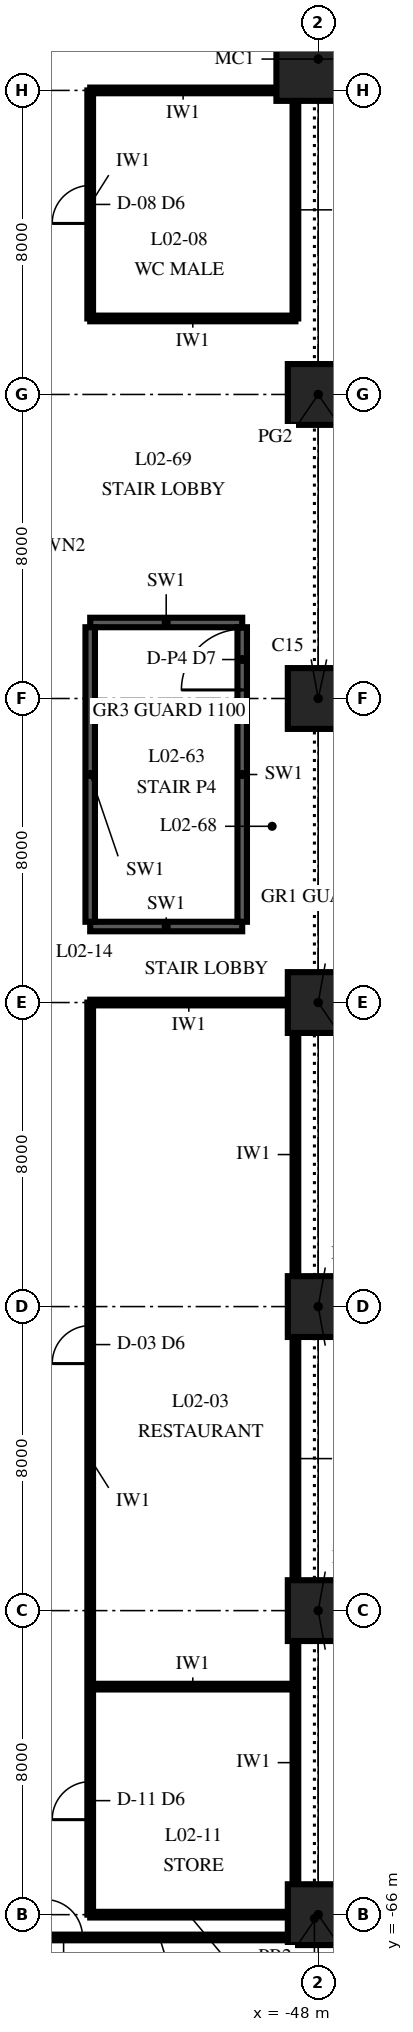
"""IFC4 building model, lengths in metres.
Left out: names, types, materials, properties, quantities, classifications, styles, units other than length and angle.
Written with IfcOpenShell. Run it as: python <this file> out.ifc"""

import sys

from ifc_helpers import new_model, si_unit, direction, frame, frame_2d, origin, origin_2d, place, context, subcontext, project, spatial, rectangle, extrude, element, fill, save


model = new_model("IFC4")
c1 = context("Model", 3, precision=1e-05, world=origin(), true_north=direction((0.0, 1.0)))
c2 = subcontext(c1, "Body", "Model", "MODEL_VIEW")
j1 = project(units=[si_unit("LENGTHUNIT", "METRE"), si_unit("PLANEANGLEUNIT", "RADIAN")], contexts=[c1])
p1 = place(None, origin())
s1 = spatial("IfcSite", under=j1, at=p1, CompositionType="ELEMENT")
p2 = place(p1, origin())
s2 = spatial("IfcBuilding", under=s1, at=p2, CompositionType="ELEMENT")
p3 = place(p2, frame((0.0, 0.0, 12.0)))
s3 = spatial("IfcBuildingStorey", under=s2, at=p3, CompositionType="ELEMENT", Elevation=12.0)
for number, where, z_axis, x_axis in (
    (1, (-48.0, -66.0, 0.0), (0.0, 0.0, 1.0), (1.0, 0.0, 0.0)),
    (2, (-48.0, -58.0, 0.0), (0.0, 0.0, 1.0), (1.0, 0.0, 0.0)),
    (3, (-48.0, -50.0, 0.0), (0.0, 0.0, 1.0), (1.0, 0.0, 0.0)),
    (4, (-48.0, -42.0, 0.0), (0.0, 0.0, 1.0), (1.0, 0.0, 0.0)),
    (5, (-48.0, -34.0, 0.0), (0.0, 0.0, 1.0), (1.0, 0.0, 0.0)),
    (6, (-48.0, -26.0, 0.0), (0.0, 0.0, 1.0), (1.0, 0.0, 0.0)),
):
    element("IfcColumn", number, at=place(p3, frame(where, z_axis=z_axis, x_axis=x_axis)), inside=s3, PredefinedType="COLUMN", context=c2, shape_type="SweptSolid", body=[
        extrude(rectangle(XDim=1.6, YDim=1.6, at=origin_2d()), origin(), (0.0, 0.0, 1.0), 8.108),
    ])
p4 = place(p3, frame((-48.0, -17.175, 0.0), z_axis=(0.0, 0.0, 1.0), x_axis=(1.0, 0.0, 0.0)))
e7 = element("IfcColumn", 7, at=p4, inside=s3, PredefinedType="COLUMN", context=c2, shape_type="SweptSolid", body=[
    extrude(rectangle(XDim=2.2, YDim=2.2, at=origin_2d()), origin(), (0.0, 0.0, 1.0), 8.6),
])
for number, where, z_axis, x_axis in (
    (8, (-54.0, -40.0, 0.0), (0.0, 0.0, 1.0), (1.0, 0.0, 0.0)),
    (9, (-50.0, -32.0, 0.0), (0.0, 0.0, 1.0), (-1.0, 0.0, 0.0)),
):
    element("IfcWall", number, at=place(p3, frame(where, z_axis=z_axis, x_axis=x_axis)), inside=s3, PredefinedType="SOLIDWALL", context=c2, shape_type="SweptSolid", body=[
        extrude(rectangle(XDim=4.0, YDim=0.25, at=frame_2d((2.0, 0.0))), origin(), (0.0, 0.0, 1.0), 7.0),
    ])
p5 = place(p3, frame((-50.0, -39.875, 0.0), z_axis=(0.0, 0.0, 1.0), x_axis=(0.0, 1.0, 0.0)))
e10 = element("IfcWall", 10, at=p5, inside=s3, PredefinedType="SOLIDWALL", context=c2, shape_type="SweptSolid", body=[
    extrude(rectangle(XDim=7.75, YDim=0.25, at=frame_2d((3.875, 0.0))), origin(), (0.0, 0.0, 1.0), 7.0),
])
p6 = place(p5, frame((6.1, 0.0, 0.0)))
e11 = element("IfcOpeningElement", 11, at=p6, cuts=e10, PredefinedType="OPENING", context=c2, shape_type="SweptSolid", body=[
    extrude(rectangle(XDim=1.6, YDim=2.1, at=frame_2d((0.8, 1.05))), frame((0.0, 0.14, 0.0), z_axis=(0.0, -1.0, 0.0), x_axis=(1.0, 0.0, 0.0)), (0.0, 0.0, 1.0), 0.28),
])
p7 = place(p3, frame((-54.0, -32.125, 0.0), z_axis=(0.0, 0.0, 1.0), x_axis=(0.0, -1.0, 0.0)))
e12 = element("IfcWall", 12, at=p7, inside=s3, PredefinedType="SOLIDWALL", context=c2, shape_type="SweptSolid", body=[
    extrude(rectangle(XDim=7.75, YDim=0.25, at=frame_2d((3.875, 0.0))), origin(), (0.0, 0.0, 1.0), 7.0),
])
p8 = place(p3, frame((-54.0, -66.0, 0.0), z_axis=(0.0, 0.0, 1.0), x_axis=(0.0, 1.0, 0.0)))
e13 = element("IfcWall", 13, at=p8, inside=s3, PredefinedType="PARTITIONING", context=c2, shape_type="SweptSolid", body=[
    extrude(rectangle(XDim=24.0, YDim=0.15, at=frame_2d((12.0, 0.0))), origin(), (0.0, 0.0, 1.0), 6.7),
])
p9 = place(p8, frame((2.5, 0.0, 0.0)))
e14 = element("IfcOpeningElement", 14, at=p9, cuts=e13, PredefinedType="OPENING", context=c2, shape_type="SweptSolid", body=[
    extrude(rectangle(XDim=1.0, YDim=2.1, at=frame_2d((0.5, 1.05))), frame((0.0, 0.09, 0.0), z_axis=(0.0, -1.0, 0.0), x_axis=(1.0, 0.0, 0.0)), (0.0, 0.0, 1.0), 0.18),
])
p10 = place(p8, frame((14.5, 0.0, 0.0)))
e15 = element("IfcOpeningElement", 15, at=p10, cuts=e13, PredefinedType="OPENING", context=c2, shape_type="SweptSolid", body=[
    extrude(rectangle(XDim=1.0, YDim=2.1, at=frame_2d((0.5, 1.05))), frame((0.0, 0.09, 0.0), z_axis=(0.0, -1.0, 0.0), x_axis=(1.0, 0.0, 0.0)), (0.0, 0.0, 1.0), 0.18),
])
p11 = place(p3, frame((-54.0, -24.0, 0.0), z_axis=(0.0, 0.0, 1.0), x_axis=(0.0, 1.0, 0.0)))
e16 = element("IfcWall", 16, at=p11, inside=s3, PredefinedType="PARTITIONING", context=c2, shape_type="SweptSolid", body=[
    extrude(rectangle(XDim=6.0, YDim=0.15, at=frame_2d((3.0, 0.0))), origin(), (0.0, 0.0, 1.0), 6.7),
])
p12 = place(p11, frame((2.5, 0.0, 0.0)))
e17 = element("IfcOpeningElement", 17, at=p12, cuts=e16, PredefinedType="OPENING", context=c2, shape_type="SweptSolid", body=[
    extrude(rectangle(XDim=1.0, YDim=2.1, at=frame_2d((0.5, 1.05))), frame((0.0, 0.09, 0.0), z_axis=(0.0, -1.0, 0.0), x_axis=(1.0, 0.0, 0.0)), (0.0, 0.0, 1.0), 0.18),
])
for number, where, z_axis, x_axis in (
    (18, (-48.6, -65.19, 0.0), (0.0, 0.0, 1.0), (0.0, 1.0, 0.0)),
    (19, (-48.6, -57.19, 0.0), (0.0, 0.0, 1.0), (0.0, 1.0, 0.0)),
    (20, (-48.6, -49.19, 0.0), (0.0, 0.0, 1.0), (0.0, 1.0, 0.0)),
):
    element("IfcWall", number, at=place(p3, frame(where, z_axis=z_axis, x_axis=x_axis)), inside=s3, PredefinedType="PARTITIONING", context=c2, shape_type="SweptSolid", body=[
        extrude(rectangle(XDim=6.38, YDim=0.15, at=frame_2d((3.19, 0.0))), origin(), (0.0, 0.0, 1.0), 6.7),
    ])
p13 = place(p3, frame((-48.6, -24.0, 0.0), z_axis=(0.0, 0.0, 1.0), x_axis=(0.0, 1.0, 0.0)))
e21 = element("IfcWall", 21, at=p13, inside=s3, PredefinedType="PARTITIONING", context=c2, shape_type="SweptSolid", body=[
    extrude(rectangle(XDim=5.715, YDim=0.15, at=frame_2d((2.857, 0.0))), origin(), (0.0, 0.0, 1.0), 6.7),
])
p14 = place(p3, frame((-55.54, -66.6, 0.0), z_axis=(0.0, 0.0, 1.0), x_axis=(1.0, 0.0, 0.0)))
e22 = element("IfcWall", 22, at=p14, inside=s3, PredefinedType="PARTITIONING", context=c2, shape_type="SweptSolid", body=[
    extrude(rectangle(XDim=6.73, YDim=0.15, at=frame_2d((3.365, 0.0))), origin(), (0.0, 0.0, 1.0), 5.099),
])
p15 = place(p14, frame((0.34, 0.0, 0.0)))
e23 = element("IfcOpeningElement", 23, at=p15, cuts=e22, PredefinedType="OPENING", context=c2, shape_type="SweptSolid", body=[
    extrude(rectangle(XDim=1.0, YDim=2.1, at=frame_2d((0.5, 1.05))), frame((0.0, 0.09, 0.0), z_axis=(0.0, -1.0, 0.0), x_axis=(1.0, 0.0, 0.0)), (0.0, 0.0, 1.0), 0.18),
])
p16 = place(p3, frame((-54.0, -66.0, 0.0), z_axis=(0.0, 0.0, 1.0), x_axis=(1.0, 0.0, 0.0)))
e24 = element("IfcWall", 24, at=p16, inside=s3, PredefinedType="PARTITIONING", context=c2, shape_type="SweptSolid", body=[
    extrude(rectangle(XDim=5.19, YDim=0.15, at=frame_2d((2.595, 0.0))), origin(), (0.0, 0.0, 1.0), 5.099),
])
p17 = place(p3, frame((-54.0, -60.0, 0.0), z_axis=(0.0, 0.0, 1.0), x_axis=(1.0, 0.0, 0.0)))
e25 = element("IfcWall", 25, at=p17, inside=s3, PredefinedType="PARTITIONING", context=c2, shape_type="SweptSolid", body=[
    extrude(rectangle(XDim=5.4, YDim=0.15, at=frame_2d((2.7, 0.0))), origin(), (0.0, 0.0, 1.0), 6.7),
])
p18 = place(p3, frame((-54.0, -42.0, 0.0), z_axis=(0.0, 0.0, 1.0), x_axis=(1.0, 0.0, 0.0)))
e26 = element("IfcWall", 26, at=p18, inside=s3, PredefinedType="PARTITIONING", context=c2, shape_type="SweptSolid", body=[
    extrude(rectangle(XDim=5.19, YDim=0.15, at=frame_2d((2.595, 0.0))), origin(), (0.0, 0.0, 1.0), 5.099),
])
p19 = place(p3, frame((-54.0, -24.0, 0.0), z_axis=(0.0, 0.0, 1.0), x_axis=(1.0, 0.0, 0.0)))
e27 = element("IfcWall", 27, at=p19, inside=s3, PredefinedType="PARTITIONING", context=c2, shape_type="SweptSolid", body=[
    extrude(rectangle(XDim=5.4, YDim=0.15, at=frame_2d((2.7, 0.0))), origin(), (0.0, 0.0, 1.0), 6.7),
])
p20 = place(p3, frame((-54.0, -18.0, 0.0), z_axis=(0.0, 0.0, 1.0), x_axis=(1.0, 0.0, 0.0)))
e28 = element("IfcWall", 28, at=p20, inside=s3, PredefinedType="PARTITIONING", context=c2, shape_type="SweptSolid", body=[
    extrude(rectangle(XDim=4.89, YDim=0.15, at=frame_2d((2.445, 0.0))), origin(), (0.0, 0.0, 1.0), 6.7),
])
p21 = place(p6, origin())
e29 = element("IfcDoor", 29, at=p21, inside=s3, OperationType="DOUBLE_DOOR_SINGLE_SWING", PredefinedType="DOOR", context=c2, shape_type="SweptSolid", body=[
    extrude(rectangle(XDim=1.6, YDim=2.1, at=frame_2d((0.8, 1.05))), frame((0.0, 0.125, 0.0), z_axis=(0.0, -1.0, 0.0), x_axis=(1.0, 0.0, 0.0)), (0.0, 0.0, 1.0), 0.25),
])
fill(e11, e29)
p22 = place(p9, origin())
e30 = element("IfcDoor", 30, at=p22, inside=s3, OperationType="SINGLE_SWING_LEFT", PredefinedType="DOOR", context=c2, shape_type="SweptSolid", body=[
    extrude(rectangle(XDim=1.0, YDim=2.1, at=frame_2d((0.5, 1.05))), frame((0.0, 0.075, 0.0), z_axis=(0.0, -1.0, 0.0), x_axis=(1.0, 0.0, 0.0)), (0.0, 0.0, 1.0), 0.149),
])
fill(e14, e30)
p23 = place(p10, origin())
e31 = element("IfcDoor", 31, at=p23, inside=s3, OperationType="SINGLE_SWING_LEFT", PredefinedType="DOOR", context=c2, shape_type="SweptSolid", body=[
    extrude(rectangle(XDim=1.0, YDim=2.1, at=frame_2d((0.5, 1.05))), frame((0.0, 0.075, 0.0), z_axis=(0.0, -1.0, 0.0), x_axis=(1.0, 0.0, 0.0)), (0.0, 0.0, 1.0), 0.149),
])
fill(e15, e31)
p24 = place(p12, origin())
e32 = element("IfcDoor", 32, at=p24, inside=s3, OperationType="SINGLE_SWING_LEFT", PredefinedType="DOOR", context=c2, shape_type="SweptSolid", body=[
    extrude(rectangle(XDim=1.0, YDim=2.1, at=frame_2d((0.5, 1.05))), frame((0.0, 0.075, 0.0), z_axis=(0.0, -1.0, 0.0), x_axis=(1.0, 0.0, 0.0)), (0.0, 0.0, 1.0), 0.149),
])
fill(e17, e32)
p25 = place(p15, origin())
e33 = element("IfcDoor", 33, at=p25, inside=s3, OperationType="SINGLE_SWING_LEFT", PredefinedType="DOOR", context=c2, shape_type="SweptSolid", body=[
    extrude(rectangle(XDim=1.0, YDim=2.1, at=frame_2d((0.5, 1.05))), frame((0.0, 0.075, 0.0), z_axis=(0.0, -1.0, 0.0), x_axis=(1.0, 0.0, 0.0)), (0.0, 0.0, 1.0), 0.149),
])
fill(e23, e33)
save(model, sys.argv[1])
